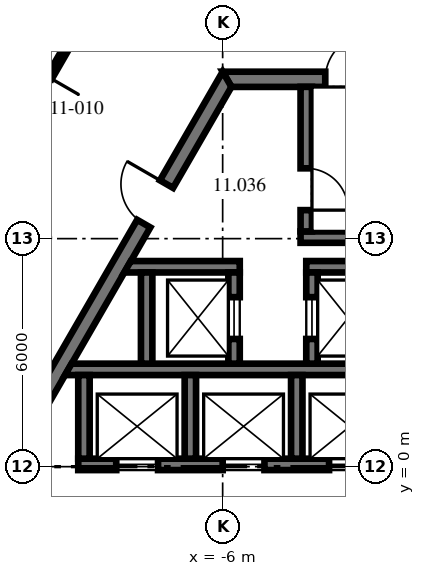
"""IFC4 building model, lengths in metres.
Left out: names, types, materials, properties, quantities, classifications, styles, units other than length and angle.
Written with IfcOpenShell. Run it as: python <this file> out.ifc"""

import sys

from ifc_helpers import new_model, si_unit, direction, frame, frame_2d, origin, place, context, subcontext, project, spatial, polyline, rectangle, outline, extrude, source, transform, mapped, element, fill, save


model = new_model("IFC4")
c1 = context("Model", 3, precision=1e-05, world=origin(), true_north=direction((0.0, 1.0)))
c2 = subcontext(c1, "Body", "Model", "MODEL_VIEW")
j1 = project(units=[si_unit("LENGTHUNIT", "METRE"), si_unit("PLANEANGLEUNIT", "RADIAN")], contexts=[c1])
p1 = place(None, origin())
s1 = spatial("IfcSite", under=j1, at=p1, CompositionType="ELEMENT")
p2 = place(p1, origin())
s2 = spatial("IfcBuilding", under=s1, at=p2, CompositionType="ELEMENT")
p3 = place(p2, frame((0.0, 0.0, 50.4)))
s3 = spatial("IfcBuildingStorey", under=s2, at=p3, CompositionType="ELEMENT", Elevation=50.4)
m1 = source(origin(), c2, "Body", "SweptSolid", [
    extrude(outline(polyline([(-0.115, -0.2), (11.885, -0.2), (11.654, 0.2), (0.115, 0.2), (-0.115, -0.2)])), origin(), (0.0, 0.0, 1.0), 4.05),
])
p4 = place(p3, frame((5.885, 10.192, 0.0), z_axis=(0.0, 0.0, 1.0), x_axis=(-1.0, 0.0, 0.0)))
e1 = element("IfcWall", 1, at=p4, inside=s3, PredefinedType="SHEAR", context=c2, shape_type="MappedRepresentation", body=[
    mapped(m1, transform((0.0, 0.0, 0.0), scale=1.0)),
])
p5 = place(p4, frame((7.985, 0.0, 0.0)))
e2 = element("IfcOpeningElement", 2, at=p5, cuts=e1, PredefinedType="OPENING", context=c2, shape_type="SweptSolid", body=[
    extrude(rectangle(XDim=1.2, YDim=2.1, at=frame_2d((0.6, 1.05))), frame((0.0, 0.21, 0.0), z_axis=(0.0, -1.0, 0.0), x_axis=(1.0, 0.0, 0.0)), (0.0, 0.0, 1.0), 0.42),
])
p6 = place(p3, frame((-5.885, 10.192, 0.0), z_axis=(0.0, 0.0, 1.0), x_axis=(-0.499996592174, -0.866027371285, 0.0)))
e3 = element("IfcWall", 3, at=p6, inside=s3, PredefinedType="SHEAR", context=c2, shape_type="MappedRepresentation", body=[
    mapped(m1, transform((0.0, 0.0, 0.0), scale=1.0)),
])
p7 = place(p6, frame((3.185, 0.0, 0.0)))
e4 = element("IfcOpeningElement", 4, at=p7, cuts=e3, PredefinedType="OPENING", context=c2, shape_type="SweptSolid", body=[
    extrude(rectangle(XDim=1.2, YDim=2.1, at=frame_2d((0.6, 1.05))), frame((0.0, 0.21, 0.0), z_axis=(0.0, -1.0, 0.0), x_axis=(1.0, 0.0, 0.0)), (0.0, 0.0, 1.0), 0.42),
])
p8 = place(p3, frame((-11.769, 0.0, 0.0), z_axis=(0.0, 0.0, 1.0), x_axis=(0.499996592174, -0.866027371285, 0.0)))
e5 = element("IfcWall", 5, at=p8, inside=s3, PredefinedType="SHEAR", context=c2, shape_type="MappedRepresentation", body=[
    mapped(m1, transform((0.0, 0.0, 0.0), scale=1.0)),
])
p9 = place(p8, frame((1.405, 0.0, 0.0)))
e6 = element("IfcOpeningElement", 6, at=p9, cuts=e5, PredefinedType="OPENING", context=c2, shape_type="SweptSolid", body=[
    extrude(rectangle(XDim=1.8, YDim=2.1, at=frame_2d((0.9, 1.05))), frame((0.0, 0.21, 0.0), z_axis=(0.0, -1.0, 0.0), x_axis=(1.0, 0.0, 0.0)), (0.0, 0.0, 1.0), 0.42),
])
p10 = place(p8, frame((7.915, 0.0, 0.0)))
e7 = element("IfcOpeningElement", 7, at=p10, cuts=e5, PredefinedType="OPENING", context=c2, shape_type="SweptSolid", body=[
    extrude(rectangle(XDim=1.2, YDim=2.1, at=frame_2d((0.6, 1.05))), frame((0.0, 0.21, 0.0), z_axis=(0.0, -1.0, 0.0), x_axis=(1.0, 0.0, 0.0)), (0.0, 0.0, 1.0), 0.42),
])
p11 = place(p3, frame((-9.8, 0.06, 0.0), z_axis=(0.0, 0.0, 1.0), x_axis=(1.0, 0.0, 0.0)))
e8 = element("IfcWall", 8, at=p11, inside=s3, PredefinedType="SHEAR", context=c2, shape_type="SweptSolid", body=[
    extrude(rectangle(XDim=11.5, YDim=0.3, at=frame_2d((5.75, 0.0))), origin(), (0.0, 0.0, 1.0), 4.05),
])
p12 = place(p11, frame((1.0, 0.0, 0.0)))
e9 = element("IfcOpeningElement", 9, at=p12, cuts=e8, PredefinedType="OPENING", context=c2, shape_type="SweptSolid", body=[
    extrude(rectangle(XDim=1.1, YDim=2.1, at=frame_2d((0.55, 1.05))), frame((0.0, 0.16, 0.0), z_axis=(0.0, -1.0, 0.0), x_axis=(1.0, 0.0, 0.0)), (0.0, 0.0, 1.0), 0.32),
])
p13 = place(p11, frame((3.8, 0.0, 0.0)))
e10 = element("IfcOpeningElement", 10, at=p13, cuts=e8, PredefinedType="OPENING", context=c2, shape_type="SweptSolid", body=[
    extrude(rectangle(XDim=1.1, YDim=2.1, at=frame_2d((0.55, 1.05))), frame((0.0, 0.16, 0.0), z_axis=(0.0, -1.0, 0.0), x_axis=(1.0, 0.0, 0.0)), (0.0, 0.0, 1.0), 0.32),
])
p14 = place(p11, frame((6.6, 0.0, 0.0)))
e11 = element("IfcOpeningElement", 11, at=p14, cuts=e8, PredefinedType="OPENING", context=c2, shape_type="SweptSolid", body=[
    extrude(rectangle(XDim=1.1, YDim=2.1, at=frame_2d((0.55, 1.05))), frame((0.0, 0.16, 0.0), z_axis=(0.0, -1.0, 0.0), x_axis=(1.0, 0.0, 0.0)), (0.0, 0.0, 1.0), 0.32),
])
p15 = place(p11, frame((9.4, 0.0, 0.0)))
e12 = element("IfcOpeningElement", 12, at=p15, cuts=e8, PredefinedType="OPENING", context=c2, shape_type="SweptSolid", body=[
    extrude(rectangle(XDim=1.1, YDim=2.1, at=frame_2d((0.55, 1.05))), frame((0.0, 0.16, 0.0), z_axis=(0.0, -1.0, 0.0), x_axis=(1.0, 0.0, 0.0)), (0.0, 0.0, 1.0), 0.32),
])
p16 = place(p3, frame((-9.8, 2.56, 0.0), z_axis=(0.0, 0.0, 1.0), x_axis=(1.0, 0.0, 0.0)))
e13 = element("IfcWall", 13, at=p16, inside=s3, PredefinedType="SHEAR", context=c2, shape_type="SweptSolid", body=[
    extrude(outline(polyline([(11.2, -0.15), (-0.349, -0.15), (-0.176, 0.15), (11.2, 0.15), (11.2, -0.15)])), origin(), (0.0, 0.0, 1.0), 4.05),
])
m2 = source(origin(), c2, "Body", "SweptSolid", [
    extrude(rectangle(XDim=2.2, YDim=0.3, at=frame_2d((1.1, 0.0))), origin(), (0.0, 0.0, 1.0), 4.05),
])
p17 = place(p3, frame((-9.65, 0.21, 0.0), z_axis=(0.0, 0.0, 1.0), x_axis=(0.0, 1.0, 0.0)))
e14 = element("IfcWall", 14, at=p17, inside=s3, PredefinedType="SHEAR", context=c2, shape_type="MappedRepresentation", body=[
    mapped(m2, transform((0.0, 0.0, 0.0), scale=1.0)),
])
p18 = place(p3, frame((-3.95, 6.04, 0.0), z_axis=(0.0, 0.0, 1.0), x_axis=(1.0, 0.0, 0.0)))
e15 = element("IfcWall", 15, at=p18, inside=s3, PredefinedType="SHEAR", context=c2, shape_type="SweptSolid", body=[
    extrude(rectangle(XDim=7.9, YDim=0.3, at=frame_2d((3.95, 0.0))), origin(), (0.0, 0.0, 1.0), 4.05),
])
m3 = source(origin(), c2, "Body", "SweptSolid", [
    extrude(outline(polyline([(0.0, -0.15), (0.0, 0.15), (3.804, 0.15), (3.804, -0.15), (0.0, -0.15)])), origin(), (0.0, 0.0, 1.0), 4.05),
])
p19 = place(p3, frame((-3.8, 6.19, 0.0), z_axis=(0.0, 0.0, 1.0), x_axis=(0.0, 1.0, 0.0)))
e16 = element("IfcWall", 16, at=p19, inside=s3, PredefinedType="SHEAR", context=c2, shape_type="MappedRepresentation", body=[
    mapped(m3, transform((0.0, 0.0, 0.0), scale=1.0)),
])
p20 = place(p19, frame((0.56, 0.0, 0.0)))
e17 = element("IfcOpeningElement", 17, at=p20, cuts=e16, PredefinedType="OPENING", context=c2, shape_type="SweptSolid", body=[
    extrude(rectangle(XDim=1.1, YDim=2.1, at=frame_2d((0.55, 1.05))), frame((0.0, 0.16, 0.0), z_axis=(0.0, -1.0, 0.0), x_axis=(1.0, 0.0, 0.0)), (0.0, 0.0, 1.0), 0.32),
])
p21 = place(p3, frame((-8.15, 5.26, 0.0), z_axis=(0.0, 0.0, 1.0), x_axis=(1.0, 0.0, 0.0)))
e18 = element("IfcWall", 18, at=p21, inside=s3, PredefinedType="SHEAR", context=c2, shape_type="SweptSolid", body=[
    extrude(outline(polyline([(2.6, -0.15), (-0.44, -0.15), (-0.267, 0.15), (2.6, 0.15), (2.6, -0.15)])), origin(), (0.0, 0.0, 1.0), 4.05),
])
m4 = source(origin(), c2, "Body", "SweptSolid", [
    extrude(rectangle(XDim=2.4, YDim=0.3, at=frame_2d((1.2, 0.0))), origin(), (0.0, 0.0, 1.0), 4.05),
])
p22 = place(p3, frame((-8.0, 2.71, 0.0), z_axis=(0.0, 0.0, 1.0), x_axis=(0.0, 1.0, 0.0)))
e19 = element("IfcWall", 19, at=p22, inside=s3, PredefinedType="SHEAR", context=c2, shape_type="MappedRepresentation", body=[
    mapped(m4, transform((0.0, 0.0, 0.0), scale=1.0)),
])
p23 = place(p3, frame((-5.7, 2.71, 0.0), z_axis=(0.0, 0.0, 1.0), x_axis=(0.0, 1.0, 0.0)))
e20 = element("IfcWall", 20, at=p23, inside=s3, PredefinedType="SHEAR", context=c2, shape_type="MappedRepresentation", body=[
    mapped(m4, transform((0.0, 0.0, 0.0), scale=1.0)),
])
p24 = place(p23, frame((0.65, 0.0, 0.0)))
e21 = element("IfcOpeningElement", 21, at=p24, cuts=e20, PredefinedType="OPENING", context=c2, shape_type="SweptSolid", body=[
    extrude(rectangle(XDim=1.1, YDim=2.1, at=frame_2d((0.55, 1.05))), frame((0.0, 0.16, 0.0), z_axis=(0.0, -1.0, 0.0), x_axis=(1.0, 0.0, 0.0)), (0.0, 0.0, 1.0), 0.32),
])
p25 = place(p3, frame((-3.8, 5.26, 0.0), z_axis=(0.0, 0.0, 1.0), x_axis=(1.0, 0.0, 0.0)))
e22 = element("IfcWall", 22, at=p25, inside=s3, PredefinedType="SHEAR", context=c2, shape_type="SweptSolid", body=[
    extrude(rectangle(XDim=2.6, YDim=0.3, at=frame_2d((1.3, 0.0))), origin(), (0.0, 0.0, 1.0), 4.05),
])
p26 = place(p3, frame((-3.65, 2.71, 0.0), z_axis=(0.0, 0.0, 1.0), x_axis=(0.0, 1.0, 0.0)))
e23 = element("IfcWall", 23, at=p26, inside=s3, PredefinedType="SHEAR", context=c2, shape_type="MappedRepresentation", body=[
    mapped(m4, transform((0.0, 0.0, 0.0), scale=1.0)),
])
p27 = place(p26, frame((0.65, 0.0, 0.0)))
e24 = element("IfcOpeningElement", 24, at=p27, cuts=e23, PredefinedType="OPENING", context=c2, shape_type="SweptSolid", body=[
    extrude(rectangle(XDim=1.1, YDim=2.1, at=frame_2d((0.55, 1.05))), frame((0.0, 0.16, 0.0), z_axis=(0.0, -1.0, 0.0), x_axis=(1.0, 0.0, 0.0)), (0.0, 0.0, 1.0), 0.32),
])
for number, where, z_axis, x_axis in (
    (25, (-6.85, 0.21, 0.0), (0.0, 0.0, 1.0), (0.0, 1.0, 0.0)),
    (26, (-4.05, 0.21, 0.0), (0.0, 0.0, 1.0), (0.0, 1.0, 0.0)),
):
    element("IfcWall", number, at=place(p3, frame(where, z_axis=z_axis, x_axis=x_axis)), inside=s3, PredefinedType="SHEAR", context=c2, shape_type="MappedRepresentation", body=[
        mapped(m2, transform((0.0, 0.0, 0.0), scale=1.0)),
    ])
p28 = place(p3, frame((-13.355, 5.398, 0.0), z_axis=(0.0, 0.0, 1.0), x_axis=(0.499984682238, 0.866034247318, 0.0)))
e27 = element("IfcWall", 27, at=p28, inside=s3, PredefinedType="PARTITIONING", context=c2, shape_type="SweptSolid", body=[
    extrude(rectangle(XDim=10.235, YDim=0.15, at=frame_2d((5.118, 0.0))), origin(), (0.0, 0.0, 1.0), 4.05),
])
p29 = place(p28, frame((4.688, 0.0, 0.0)))
e28 = element("IfcOpeningElement", 28, at=p29, cuts=e27, PredefinedType="OPENING", context=c2, shape_type="SweptSolid", body=[
    extrude(rectangle(XDim=0.9, YDim=2.1, at=frame_2d((0.45, 1.05))), frame((0.0, 0.085, 0.0), z_axis=(0.0, -1.0, 0.0), x_axis=(1.0, 0.0, 0.0)), (0.0, 0.0, 1.0), 0.17),
])
p30 = place(p3, frame((-14.708, 7.655, 0.0), z_axis=(0.0, 0.0, 1.0), x_axis=(0.500000437373, 0.866025151267, 0.0)))
e29 = element("IfcWall", 29, at=p30, inside=s3, PredefinedType="PARTITIONING", context=c2, shape_type="SweptSolid", body=[
    extrude(rectangle(XDim=10.289, YDim=0.15, at=frame_2d((5.144, 0.0))), origin(), (0.0, 0.0, 1.0), 4.05),
])
p31 = place(p30, frame((8.338, 0.0, 0.0)))
e30 = element("IfcOpeningElement", 30, at=p31, cuts=e29, PredefinedType="OPENING", context=c2, shape_type="SweptSolid", body=[
    extrude(rectangle(XDim=0.9, YDim=2.1, at=frame_2d((0.45, 1.05))), frame((0.0, 0.085, 0.0), z_axis=(0.0, -1.0, 0.0), x_axis=(1.0, 0.0, 0.0)), (0.0, 0.0, 1.0), 0.17),
])
p32 = place(p30, frame((4.531, 0.0, 0.0)))
e31 = element("IfcOpeningElement", 31, at=p32, cuts=e29, PredefinedType="OPENING", context=c2, shape_type="SweptSolid", body=[
    extrude(rectangle(XDim=0.9, YDim=2.1, at=frame_2d((0.45, 1.05))), frame((0.0, 0.085, 0.0), z_axis=(0.0, -1.0, 0.0), x_axis=(1.0, 0.0, 0.0)), (0.0, 0.0, 1.0), 0.17),
])
p33 = place(p30, frame((0.921, 0.0, 0.0)))
e32 = element("IfcOpeningElement", 32, at=p33, cuts=e29, PredefinedType="OPENING", context=c2, shape_type="SweptSolid", body=[
    extrude(rectangle(XDim=0.9, YDim=2.1, at=frame_2d((0.45, 1.05))), frame((0.0, 0.085, 0.0), z_axis=(0.0, -1.0, 0.0), x_axis=(1.0, 0.0, 0.0)), (0.0, 0.0, 1.0), 0.17),
])
p34 = place(p5, frame((1.2, 0.0, 0.0), z_axis=(0.0, 0.0, 1.0), x_axis=(-1.0, 0.0, 0.0)))
e33 = element("IfcDoor", 33, at=p34, inside=s3, OperationType="SINGLE_SWING_RIGHT", PredefinedType="DOOR", context=c2, shape_type="SweptSolid", body=[
    extrude(rectangle(XDim=1.2, YDim=2.1, at=frame_2d((0.6, 1.05))), frame((0.0, 0.025, 0.0), z_axis=(0.0, -1.0, 0.0), x_axis=(1.0, 0.0, 0.0)), (0.0, 0.0, 1.0), 0.05),
])
fill(e2, e33)
p35 = place(p7, frame((1.2, 0.0, 0.0), z_axis=(0.0, 0.0, 1.0), x_axis=(-1.0, 0.0, 0.0)))
e34 = element("IfcDoor", 34, at=p35, inside=s3, OperationType="SINGLE_SWING_RIGHT", PredefinedType="DOOR", context=c2, shape_type="SweptSolid", body=[
    extrude(rectangle(XDim=1.2, YDim=2.1, at=frame_2d((0.6, 1.05))), frame((0.0, 0.025, 0.0), z_axis=(0.0, -1.0, 0.0), x_axis=(1.0, 0.0, 0.0)), (0.0, 0.0, 1.0), 0.05),
])
fill(e4, e34)
p36 = place(p20, frame((1.1, 0.0, 0.0), z_axis=(0.0, 0.0, 1.0), x_axis=(-1.0, 0.0, 0.0)))
e35 = element("IfcDoor", 35, at=p36, inside=s3, OperationType="SINGLE_SWING_RIGHT", PredefinedType="DOOR", context=c2, shape_type="SweptSolid", body=[
    extrude(rectangle(XDim=1.1, YDim=2.1, at=frame_2d((0.55, 1.05))), frame((0.0, 0.025, 0.0), z_axis=(0.0, -1.0, 0.0), x_axis=(1.0, 0.0, 0.0)), (0.0, 0.0, 1.0), 0.05),
])
fill(e17, e35)
p37 = place(p12, origin())
e36 = element("IfcDoor", 36, at=p37, inside=s3, OperationType="DOUBLE_DOOR_SLIDING", PredefinedType="DOOR", context=c2, shape_type="SweptSolid", body=[
    extrude(rectangle(XDim=1.1, YDim=2.1, at=frame_2d((0.55, 1.05))), frame((0.0, 0.025, 0.0), z_axis=(0.0, -1.0, 0.0), x_axis=(1.0, 0.0, 0.0)), (0.0, 0.0, 1.0), 0.05),
])
fill(e9, e36)
p38 = place(p13, origin())
e37 = element("IfcDoor", 37, at=p38, inside=s3, OperationType="DOUBLE_DOOR_SLIDING", PredefinedType="DOOR", context=c2, shape_type="SweptSolid", body=[
    extrude(rectangle(XDim=1.1, YDim=2.1, at=frame_2d((0.55, 1.05))), frame((0.0, 0.025, 0.0), z_axis=(0.0, -1.0, 0.0), x_axis=(1.0, 0.0, 0.0)), (0.0, 0.0, 1.0), 0.05),
])
fill(e10, e37)
p39 = place(p14, origin())
e38 = element("IfcDoor", 38, at=p39, inside=s3, OperationType="DOUBLE_DOOR_SLIDING", PredefinedType="DOOR", context=c2, shape_type="SweptSolid", body=[
    extrude(rectangle(XDim=1.1, YDim=2.1, at=frame_2d((0.55, 1.05))), frame((0.0, 0.025, 0.0), z_axis=(0.0, -1.0, 0.0), x_axis=(1.0, 0.0, 0.0)), (0.0, 0.0, 1.0), 0.05),
])
fill(e11, e38)
p40 = place(p24, origin())
e39 = element("IfcDoor", 39, at=p40, inside=s3, OperationType="DOUBLE_DOOR_SLIDING", PredefinedType="DOOR", context=c2, shape_type="SweptSolid", body=[
    extrude(rectangle(XDim=1.1, YDim=2.1, at=frame_2d((0.55, 1.05))), frame((0.0, 0.025, 0.0), z_axis=(0.0, -1.0, 0.0), x_axis=(1.0, 0.0, 0.0)), (0.0, 0.0, 1.0), 0.05),
])
fill(e21, e39)
p41 = place(p27, origin())
e40 = element("IfcDoor", 40, at=p41, inside=s3, OperationType="DOUBLE_DOOR_SLIDING", PredefinedType="DOOR", context=c2, shape_type="SweptSolid", body=[
    extrude(rectangle(XDim=1.1, YDim=2.1, at=frame_2d((0.55, 1.05))), frame((0.0, 0.025, 0.0), z_axis=(0.0, -1.0, 0.0), x_axis=(1.0, 0.0, 0.0)), (0.0, 0.0, 1.0), 0.05),
])
fill(e24, e40)
save(model, sys.argv[1])
